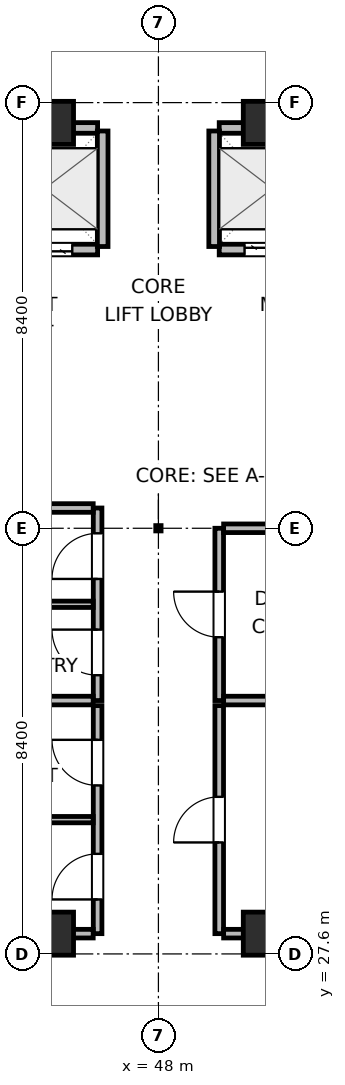
"""IFC4 building model, lengths in metres.
Left out: names, types, materials, properties, quantities, classifications, styles, units other than length and angle.
Written with IfcOpenShell. Run it as: python <this file> out.ifc"""

import sys

from ifc_helpers import new_model, si_unit, direction, frame, frame_2d, origin, origin_2d, place, context, subcontext, project, spatial, rectangle, extrude, element, fill, save


model = new_model("IFC4")
c1 = context("Model", 3, precision=1e-05, world=origin(), true_north=direction((0.0, 1.0)))
c2 = subcontext(c1, "Body", "Model", "MODEL_VIEW")
j1 = project(units=[si_unit("LENGTHUNIT", "METRE"), si_unit("PLANEANGLEUNIT", "RADIAN")], contexts=[c1])
p1 = place(None, origin())
s1 = spatial("IfcSite", under=j1, at=p1, CompositionType="ELEMENT")
p2 = place(p1, origin())
s2 = spatial("IfcBuilding", under=s1, at=p2, CompositionType="ELEMENT")
p3 = place(p2, frame((0.0, 0.0, 141.6)))
s3 = spatial("IfcBuildingStorey", under=s2, at=p3, CompositionType="ELEMENT", Elevation=141.6)
for number, where, z_axis, x_axis in (
    (1, (45.9, 28.0, 0.0), (0.0, 0.0, 1.0), (1.0, 0.0, 0.0)),
    (2, (50.1, 28.0, 0.0), (0.0, 0.0, 1.0), (1.0, 0.0, 0.0)),
    (3, (45.9, 44.0, 0.0), (0.0, 0.0, 1.0), (1.0, 0.0, 0.0)),
    (4, (50.1, 44.0, 0.0), (0.0, 0.0, 1.0), (1.0, 0.0, 0.0)),
):
    element("IfcColumn", number, at=place(p3, frame(where, z_axis=z_axis, x_axis=x_axis)), inside=s3, PredefinedType="COLUMN", context=c2, shape_type="SweptSolid", body=[
        extrude(rectangle(XDim=0.85, YDim=0.85, at=origin_2d()), origin(), (0.0, 0.0, 1.0), 3.9),
    ])
p4 = place(p3, frame((44.7, 41.5, 0.0), z_axis=(0.0, 0.0, 1.0), x_axis=(1.0, 0.0, 0.0)))
e5 = element("IfcWall", 5, at=p4, inside=s3, PredefinedType="PARTITIONING", context=c2, shape_type="SweptSolid", body=[
    extrude(rectangle(XDim=2.1, YDim=0.21, at=frame_2d((1.05, 0.0))), origin(), (0.0, 0.0, 1.0), 3.6),
])
p5 = place(p4, frame((0.5, 0.0, 0.0)))
e6 = element("IfcOpeningElement", 6, at=p5, cuts=e5, PredefinedType="OPENING", context=c2, shape_type="SweptSolid", body=[
    extrude(rectangle(XDim=1.1, YDim=2.04, at=frame_2d((0.55, 1.02))), frame((0.0, 0.115, 0.0), z_axis=(0.0, -1.0, 0.0), x_axis=(1.0, 0.0, 0.0)), (0.0, 0.0, 1.0), 0.23),
])
p6 = place(p3, frame((44.7, 43.9, 0.0), z_axis=(0.0, 0.0, 1.0), x_axis=(1.0, 0.0, 0.0)))
e7 = element("IfcWall", 7, at=p6, inside=s3, PredefinedType="PARTITIONING", context=c2, shape_type="SweptSolid", body=[
    extrude(rectangle(XDim=2.1, YDim=0.21, at=frame_2d((1.05, 0.0))), origin(), (0.0, 0.0, 1.0), 2.485),
])
p7 = place(p3, frame((46.9, 41.56, 0.0), z_axis=(0.0, 0.0, 1.0), x_axis=(0.0, 1.0, 0.0)))
e8 = element("IfcWall", 8, at=p7, inside=s3, PredefinedType="PARTITIONING", context=c2, shape_type="SweptSolid", body=[
    extrude(rectangle(XDim=2.28, YDim=0.21, at=frame_2d((1.14, 0.0))), origin(), (0.0, 0.0, 1.0), 3.6),
])
p8 = place(p3, frame((49.2, 41.5, 0.0), z_axis=(0.0, 0.0, 1.0), x_axis=(1.0, 0.0, 0.0)))
e9 = element("IfcWall", 9, at=p8, inside=s3, PredefinedType="PARTITIONING", context=c2, shape_type="SweptSolid", body=[
    extrude(rectangle(XDim=2.1, YDim=0.21, at=frame_2d((1.05, 0.0))), origin(), (0.0, 0.0, 1.0), 3.6),
])
p9 = place(p8, frame((0.5, 0.0, 0.0)))
e10 = element("IfcOpeningElement", 10, at=p9, cuts=e9, PredefinedType="OPENING", context=c2, shape_type="SweptSolid", body=[
    extrude(rectangle(XDim=1.1, YDim=2.04, at=frame_2d((0.55, 1.02))), frame((0.0, 0.115, 0.0), z_axis=(0.0, -1.0, 0.0), x_axis=(1.0, 0.0, 0.0)), (0.0, 0.0, 1.0), 0.23),
])
p10 = place(p3, frame((49.2, 43.9, 0.0), z_axis=(0.0, 0.0, 1.0), x_axis=(1.0, 0.0, 0.0)))
e11 = element("IfcWall", 11, at=p10, inside=s3, PredefinedType="PARTITIONING", context=c2, shape_type="SweptSolid", body=[
    extrude(rectangle(XDim=2.1, YDim=0.21, at=frame_2d((1.05, 0.0))), origin(), (0.0, 0.0, 1.0), 2.485),
])
p11 = place(p3, frame((49.1, 41.56, 0.0), z_axis=(0.0, 0.0, 1.0), x_axis=(0.0, 1.0, 0.0)))
e12 = element("IfcWall", 12, at=p11, inside=s3, PredefinedType="PARTITIONING", context=c2, shape_type="SweptSolid", body=[
    extrude(rectangle(XDim=2.28, YDim=0.21, at=frame_2d((1.14, 0.0))), origin(), (0.0, 0.0, 1.0), 3.6),
])
p12 = place(p3, frame((46.8, 32.6, 0.0), z_axis=(0.0, 0.0, 1.0), x_axis=(0.0, 1.0, 0.0)))
e13 = element("IfcWall", 13, at=p12, inside=s3, PredefinedType="PARTITIONING", context=c2, shape_type="SweptSolid", body=[
    extrude(rectangle(XDim=3.8, YDim=0.17, at=frame_2d((1.9, 0.0))), origin(), (0.0, 0.0, 1.0), 3.6),
])
p13 = place(p12, frame((0.5, 0.0, 0.0)))
e14 = element("IfcOpeningElement", 14, at=p13, cuts=e13, PredefinedType="OPENING", context=c2, shape_type="SweptSolid", body=[
    extrude(rectangle(XDim=0.9, YDim=2.02, at=frame_2d((0.45, 1.01))), frame((0.0, 0.095, 0.0), z_axis=(0.0, -1.0, 0.0), x_axis=(1.0, 0.0, 0.0)), (0.0, 0.0, 1.0), 0.19),
])
p14 = place(p12, frame((2.4, 0.0, 0.0)))
e15 = element("IfcOpeningElement", 15, at=p14, cuts=e13, PredefinedType="OPENING", context=c2, shape_type="SweptSolid", body=[
    extrude(rectangle(XDim=0.9, YDim=2.02, at=frame_2d((0.45, 1.01))), frame((0.0, 0.095, 0.0), z_axis=(0.0, -1.0, 0.0), x_axis=(1.0, 0.0, 0.0)), (0.0, 0.0, 1.0), 0.19),
])
for number, where, z_axis, x_axis in (
    (16, (43.8, 32.6, 0.0), (0.0, 0.0, 1.0), (1.0, 0.0, 0.0)),
    (17, (43.8, 36.4, 0.0), (0.0, 0.0, 1.0), (1.0, 0.0, 0.0)),
):
    element("IfcWall", number, at=place(p3, frame(where, z_axis=z_axis, x_axis=x_axis)), inside=s3, PredefinedType="PARTITIONING", context=c2, shape_type="SweptSolid", body=[
        extrude(rectangle(XDim=2.913, YDim=0.17, at=frame_2d((1.457, 0.0))), origin(), (0.0, 0.0, 1.0), 3.6),
    ])
p15 = place(p3, frame((43.8, 34.5, 0.0), z_axis=(0.0, 0.0, 1.0), x_axis=(1.0, 0.0, 0.0)))
e18 = element("IfcWall", 18, at=p15, inside=s3, PredefinedType="PARTITIONING", context=c2, shape_type="SweptSolid", body=[
    extrude(rectangle(XDim=2.913, YDim=0.125, at=frame_2d((1.457, 0.0))), origin(), (0.0, 0.0, 1.0), 3.6),
])
p16 = place(p3, frame((49.2, 32.6, 0.0), z_axis=(0.0, 0.0, 1.0), x_axis=(0.0, 1.0, 0.0)))
e19 = element("IfcWall", 19, at=p16, inside=s3, PredefinedType="PARTITIONING", context=c2, shape_type="SweptSolid", body=[
    extrude(rectangle(XDim=3.4, YDim=0.17, at=frame_2d((1.7, 0.0))), origin(), (0.0, 0.0, 1.0), 3.6),
])
p17 = place(p16, frame((1.25, 0.0, 0.0)))
e20 = element("IfcOpeningElement", 20, at=p17, cuts=e19, PredefinedType="OPENING", context=c2, shape_type="SweptSolid", body=[
    extrude(rectangle(XDim=0.9, YDim=2.02, at=frame_2d((0.45, 1.01))), frame((0.0, 0.095, 0.0), z_axis=(0.0, -1.0, 0.0), x_axis=(1.0, 0.0, 0.0)), (0.0, 0.0, 1.0), 0.19),
])
for number, where, z_axis, x_axis in (
    (21, (49.287, 32.6, 0.0), (0.0, 0.0, 1.0), (1.0, 0.0, 0.0)),
    (22, (49.287, 36.0, 0.0), (0.0, 0.0, 1.0), (1.0, 0.0, 0.0)),
):
    element("IfcWall", number, at=place(p3, frame(where, z_axis=z_axis, x_axis=x_axis)), inside=s3, PredefinedType="PARTITIONING", context=c2, shape_type="SweptSolid", body=[
        extrude(rectangle(XDim=2.913, YDim=0.17, at=frame_2d((1.457, 0.0))), origin(), (0.0, 0.0, 1.0), 3.6),
    ])
p18 = place(p3, frame((46.8, 28.0, 0.0), z_axis=(0.0, 0.0, 1.0), x_axis=(0.0, 1.0, 0.0)))
e23 = element("IfcWall", 23, at=p18, inside=s3, PredefinedType="PARTITIONING", context=c2, shape_type="SweptSolid", body=[
    extrude(rectangle(XDim=4.5, YDim=0.17, at=frame_2d((2.25, 0.0))), origin(), (0.0, 0.0, 1.0), 3.6),
])
p19 = place(p18, frame((0.675, 0.0, 0.0)))
e24 = element("IfcOpeningElement", 24, at=p19, cuts=e23, PredefinedType="OPENING", context=c2, shape_type="SweptSolid", body=[
    extrude(rectangle(XDim=0.9, YDim=2.02, at=frame_2d((0.45, 1.01))), frame((0.0, 0.095, 0.0), z_axis=(0.0, -1.0, 0.0), x_axis=(1.0, 0.0, 0.0)), (0.0, 0.0, 1.0), 0.19),
])
p20 = place(p18, frame((2.925, 0.0, 0.0)))
e25 = element("IfcOpeningElement", 25, at=p20, cuts=e23, PredefinedType="OPENING", context=c2, shape_type="SweptSolid", body=[
    extrude(rectangle(XDim=0.9, YDim=2.02, at=frame_2d((0.45, 1.01))), frame((0.0, 0.095, 0.0), z_axis=(0.0, -1.0, 0.0), x_axis=(1.0, 0.0, 0.0)), (0.0, 0.0, 1.0), 0.19),
])
p21 = place(p3, frame((42.5, 28.0, 0.0), z_axis=(0.0, 0.0, 1.0), x_axis=(1.0, 0.0, 0.0)))
e26 = element("IfcWall", 26, at=p21, inside=s3, PredefinedType="PARTITIONING", context=c2, shape_type="SweptSolid", body=[
    extrude(rectangle(XDim=4.213, YDim=0.17, at=frame_2d((2.106, 0.0))), origin(), (0.0, 0.0, 1.0), 2.485),
])
p22 = place(p3, frame((42.5, 30.25, 0.0), z_axis=(0.0, 0.0, 1.0), x_axis=(1.0, 0.0, 0.0)))
e27 = element("IfcWall", 27, at=p22, inside=s3, PredefinedType="PARTITIONING", context=c2, shape_type="SweptSolid", body=[
    extrude(rectangle(XDim=4.213, YDim=0.125, at=frame_2d((2.106, 0.0))), origin(), (0.0, 0.0, 1.0), 3.6),
])
p23 = place(p3, frame((49.2, 28.0, 0.0), z_axis=(0.0, 0.0, 1.0), x_axis=(0.0, 1.0, 0.0)))
e28 = element("IfcWall", 28, at=p23, inside=s3, PredefinedType="PARTITIONING", context=c2, shape_type="SweptSolid", body=[
    extrude(rectangle(XDim=4.5, YDim=0.17, at=frame_2d((2.25, 0.0))), origin(), (0.0, 0.0, 1.0), 3.6),
])
p24 = place(p23, frame((1.8, 0.0, 0.0)))
e29 = element("IfcOpeningElement", 29, at=p24, cuts=e28, PredefinedType="OPENING", context=c2, shape_type="SweptSolid", body=[
    extrude(rectangle(XDim=0.9, YDim=2.02, at=frame_2d((0.45, 1.01))), frame((0.0, 0.095, 0.0), z_axis=(0.0, -1.0, 0.0), x_axis=(1.0, 0.0, 0.0)), (0.0, 0.0, 1.0), 0.19),
])
p25 = place(p3, frame((49.287, 28.0, 0.0), z_axis=(0.0, 0.0, 1.0), x_axis=(1.0, 0.0, 0.0)))
e30 = element("IfcWall", 30, at=p25, inside=s3, PredefinedType="PARTITIONING", context=c2, shape_type="SweptSolid", body=[
    extrude(rectangle(XDim=4.213, YDim=0.17, at=frame_2d((2.106, 0.0))), origin(), (0.0, 0.0, 1.0), 2.485),
])
p26 = place(p5, origin())
e31 = element("IfcDoor", 31, at=p26, inside=s3, OperationType="DOUBLE_DOOR_SLIDING", PredefinedType="DOOR", context=c2, shape_type="SweptSolid", body=[
    extrude(rectangle(XDim=1.1, YDim=2.04, at=frame_2d((0.55, 1.02))), frame((0.0, 0.025, 0.0), z_axis=(0.0, -1.0, 0.0), x_axis=(1.0, 0.0, 0.0)), (0.0, 0.0, 1.0), 0.05),
])
fill(e6, e31)
p27 = place(p9, origin())
e32 = element("IfcDoor", 32, at=p27, inside=s3, OperationType="DOUBLE_DOOR_SLIDING", PredefinedType="DOOR", context=c2, shape_type="SweptSolid", body=[
    extrude(rectangle(XDim=1.1, YDim=2.04, at=frame_2d((0.55, 1.02))), frame((0.0, 0.025, 0.0), z_axis=(0.0, -1.0, 0.0), x_axis=(1.0, 0.0, 0.0)), (0.0, 0.0, 1.0), 0.05),
])
fill(e10, e32)
p28 = place(p13, origin())
e33 = element("IfcDoor", 33, at=p28, inside=s3, OperationType="SINGLE_SWING_RIGHT", PredefinedType="DOOR", context=c2, shape_type="SweptSolid", body=[
    extrude(rectangle(XDim=0.9, YDim=2.02, at=frame_2d((0.45, 1.01))), frame((0.0, 0.025, 0.0), z_axis=(0.0, -1.0, 0.0), x_axis=(1.0, 0.0, 0.0)), (0.0, 0.0, 1.0), 0.05),
])
fill(e14, e33)
p29 = place(p14, origin())
e34 = element("IfcDoor", 34, at=p29, inside=s3, OperationType="SINGLE_SWING_LEFT", PredefinedType="DOOR", context=c2, shape_type="SweptSolid", body=[
    extrude(rectangle(XDim=0.9, YDim=2.02, at=frame_2d((0.45, 1.01))), frame((0.0, 0.025, 0.0), z_axis=(0.0, -1.0, 0.0), x_axis=(1.0, 0.0, 0.0)), (0.0, 0.0, 1.0), 0.05),
])
fill(e15, e34)
p30 = place(p17, origin())
e35 = element("IfcDoor", 35, at=p30, inside=s3, OperationType="SINGLE_SWING_RIGHT", PredefinedType="DOOR", context=c2, shape_type="SweptSolid", body=[
    extrude(rectangle(XDim=0.9, YDim=2.02, at=frame_2d((0.45, 1.01))), frame((0.0, 0.025, 0.0), z_axis=(0.0, -1.0, 0.0), x_axis=(1.0, 0.0, 0.0)), (0.0, 0.0, 1.0), 0.05),
])
fill(e20, e35)
p31 = place(p19, origin())
e36 = element("IfcDoor", 36, at=p31, inside=s3, OperationType="SINGLE_SWING_LEFT", PredefinedType="DOOR", context=c2, shape_type="SweptSolid", body=[
    extrude(rectangle(XDim=0.9, YDim=2.02, at=frame_2d((0.45, 1.01))), frame((0.0, 0.025, 0.0), z_axis=(0.0, -1.0, 0.0), x_axis=(1.0, 0.0, 0.0)), (0.0, 0.0, 1.0), 0.05),
])
fill(e24, e36)
p32 = place(p20, origin())
e37 = element("IfcDoor", 37, at=p32, inside=s3, OperationType="SINGLE_SWING_RIGHT", PredefinedType="DOOR", context=c2, shape_type="SweptSolid", body=[
    extrude(rectangle(XDim=0.9, YDim=2.02, at=frame_2d((0.45, 1.01))), frame((0.0, 0.025, 0.0), z_axis=(0.0, -1.0, 0.0), x_axis=(1.0, 0.0, 0.0)), (0.0, 0.0, 1.0), 0.05),
])
fill(e25, e37)
p33 = place(p24, origin())
e38 = element("IfcDoor", 38, at=p33, inside=s3, OperationType="SINGLE_SWING_LEFT", PredefinedType="DOOR", context=c2, shape_type="SweptSolid", body=[
    extrude(rectangle(XDim=0.9, YDim=2.02, at=frame_2d((0.45, 1.01))), frame((0.0, 0.025, 0.0), z_axis=(0.0, -1.0, 0.0), x_axis=(1.0, 0.0, 0.0)), (0.0, 0.0, 1.0), 0.05),
])
fill(e29, e38)
save(model, sys.argv[1])
